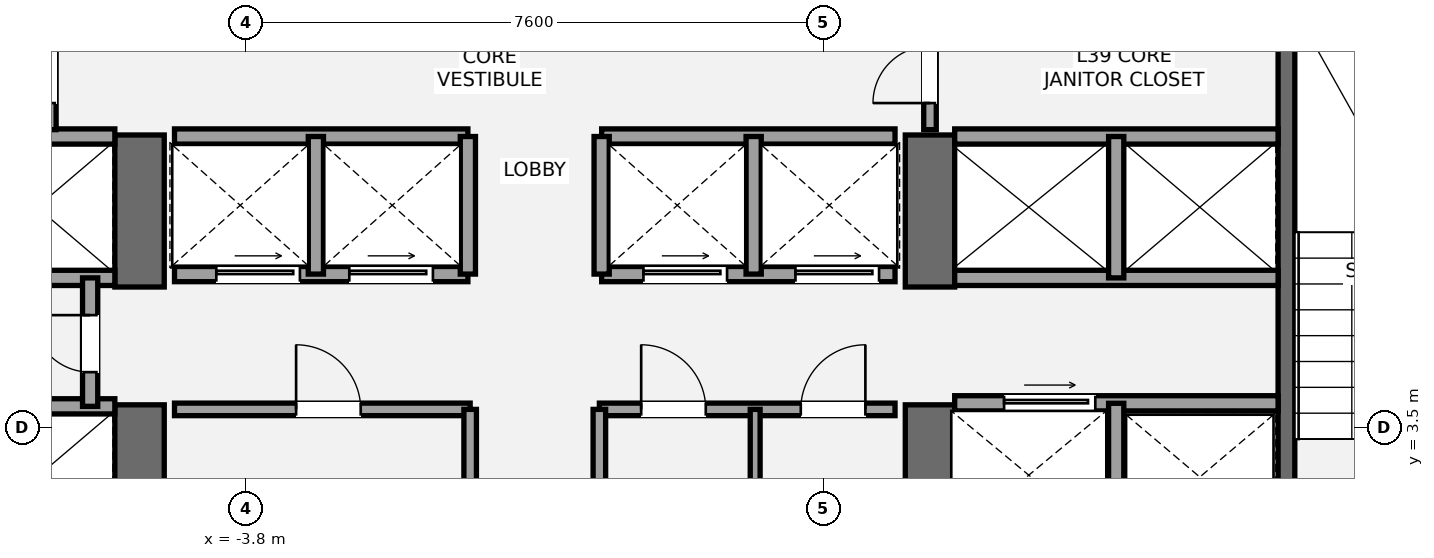
"""IFC4 building model, lengths in metres.
Left out: names, types, materials, properties, quantities, classifications, styles, units other than length and angle.
Written with IfcOpenShell. Run it as: python <this file> out.ifc"""

import sys

from ifc_helpers import new_model, si_unit, direction, frame, frame_2d, origin, place, context, subcontext, project, spatial, rectangle, extrude, element, fill, save


model = new_model("IFC4")
c1 = context("Model", 3, precision=1e-05, world=origin(), true_north=direction((0.0, 1.0)))
c2 = subcontext(c1, "Body", "Model", "MODEL_VIEW")
j1 = project(units=[si_unit("LENGTHUNIT", "METRE"), si_unit("PLANEANGLEUNIT", "RADIAN")], contexts=[c1])
p1 = place(None, origin())
s1 = spatial("IfcSite", under=j1, at=p1, CompositionType="ELEMENT")
p2 = place(p1, origin())
s2 = spatial("IfcBuilding", under=s1, at=p2, CompositionType="ELEMENT")
p3 = place(p2, frame((0.0, 0.0, 147.0)))
s3 = spatial("IfcBuildingStorey", under=s2, at=p3, CompositionType="ELEMENT", Elevation=147.0)
p4 = place(p3, frame((-5.2, 1.2, 0.0), z_axis=(0.0, 0.0, 1.0), x_axis=(0.0, 1.0, 0.0)))
e1 = element("IfcWall", 1, at=p4, inside=s3, PredefinedType="SHEAR", context=c2, shape_type="SweptSolid", body=[
    extrude(rectangle(XDim=2.6, YDim=0.65, at=frame_2d((1.3, 0.0))), origin(), (0.0, 0.0, 1.0), 3.2),
])
p5 = place(p3, frame((-5.2, 5.35, 0.0), z_axis=(0.0, 0.0, 1.0), x_axis=(0.0, 1.0, 0.0)))
e2 = element("IfcWall", 2, at=p5, inside=s3, PredefinedType="SHEAR", context=c2, shape_type="SweptSolid", body=[
    extrude(rectangle(XDim=2.0, YDim=0.65, at=frame_2d((1.0, 0.0))), origin(), (0.0, 0.0, 1.0), 3.2),
])
p6 = place(p3, frame((5.2, 1.2, 0.0), z_axis=(0.0, 0.0, 1.0), x_axis=(0.0, 1.0, 0.0)))
e3 = element("IfcWall", 3, at=p6, inside=s3, PredefinedType="SHEAR", context=c2, shape_type="SweptSolid", body=[
    extrude(rectangle(XDim=2.6, YDim=0.65, at=frame_2d((1.3, 0.0))), origin(), (0.0, 0.0, 1.0), 3.2),
])
p7 = place(p3, frame((5.2, 5.35, 0.0), z_axis=(0.0, 0.0, 1.0), x_axis=(0.0, 1.0, 0.0)))
e4 = element("IfcWall", 4, at=p7, inside=s3, PredefinedType="SHEAR", context=c2, shape_type="SweptSolid", body=[
    extrude(rectangle(XDim=2.0, YDim=0.65, at=frame_2d((1.0, 0.0))), origin(), (0.0, 0.0, 1.0), 3.2),
])
p8 = place(p3, frame((9.89, 1.85, 0.0), z_axis=(0.0, 0.0, 1.0), x_axis=(0.0, 1.0, 0.0)))
e5 = element("IfcWall", 5, at=p8, inside=s3, PredefinedType="SHEAR", context=c2, shape_type="SweptSolid", body=[
    extrude(rectangle(XDim=7.15, YDim=0.22, at=frame_2d((3.575, 0.0))), origin(), (0.0, 0.0, 1.0), 3.2),
])
for number, where, z_axis, x_axis in (
    (6, (-9.78, 3.78, 0.0), (0.0, 0.0, 1.0), (1.0, 0.0, 0.0)),
    (7, (-9.78, 5.47, 0.0), (0.0, 0.0, 1.0), (1.0, 0.0, 0.0)),
    (8, (-9.78, 7.33, 0.0), (0.0, 0.0, 1.0), (1.0, 0.0, 0.0)),
):
    element("IfcWall", number, at=place(p3, frame(where, z_axis=z_axis, x_axis=x_axis)), inside=s3, PredefinedType="SOLIDWALL", context=c2, shape_type="SweptSolid", body=[
        extrude(rectangle(XDim=4.255, YDim=0.2, at=frame_2d((2.127, 0.0))), origin(), (0.0, 0.0, 1.0), 3.02),
    ])
p9 = place(p3, frame((-5.85, 3.78, 0.0), z_axis=(0.0, 0.0, 1.0), x_axis=(0.0, 1.0, 0.0)))
e9 = element("IfcWall", 9, at=p9, inside=s3, PredefinedType="SOLIDWALL", context=c2, shape_type="SweptSolid", body=[
    extrude(rectangle(XDim=1.69, YDim=0.2, at=frame_2d((0.845, 0.0))), origin(), (0.0, 0.0, 1.0), 3.02),
])
p10 = place(p9, frame((0.45, 0.0, 0.0)))
e10 = element("IfcOpeningElement", 10, at=p10, cuts=e9, PredefinedType="OPENING", context=c2, shape_type="SweptSolid", body=[
    extrude(rectangle(XDim=0.75, YDim=2.1, at=frame_2d((0.375, 1.05))), frame((0.0, 0.11, 0.0), z_axis=(0.0, -1.0, 0.0), x_axis=(1.0, 0.0, 0.0)), (0.0, 0.0, 1.0), 0.22),
])
p11 = place(p3, frame((5.525, 3.82, 0.0), z_axis=(0.0, 0.0, 1.0), x_axis=(1.0, 0.0, 0.0)))
e11 = element("IfcWall", 11, at=p11, inside=s3, PredefinedType="SOLIDWALL", context=c2, shape_type="SweptSolid", body=[
    extrude(rectangle(XDim=4.255, YDim=0.2, at=frame_2d((2.127, 0.0))), origin(), (0.0, 0.0, 1.0), 3.02),
])
p12 = place(p11, frame((0.65, 0.0, 0.0)))
e12 = element("IfcOpeningElement", 12, at=p12, cuts=e11, PredefinedType="OPENING", context=c2, shape_type="SweptSolid", body=[
    extrude(rectangle(XDim=1.2, YDim=2.2, at=frame_2d((0.6, 1.1))), frame((0.0, 0.11, 0.0), z_axis=(0.0, -1.0, 0.0), x_axis=(1.0, 0.0, 0.0)), (0.0, 0.0, 1.0), 0.22),
])
p13 = place(p3, frame((7.65, 1.85, 0.0), z_axis=(0.0, 0.0, 1.0), x_axis=(0.0, 1.0, 0.0)))
e13 = element("IfcWall", 13, at=p13, inside=s3, PredefinedType="SOLIDWALL", context=c2, shape_type="SweptSolid", body=[
    extrude(rectangle(XDim=1.97, YDim=0.2, at=frame_2d((0.985, 0.0))), origin(), (0.0, 0.0, 1.0), 3.02),
])
for number, where, z_axis, x_axis in (
    (14, (5.525, 5.47, 0.0), (0.0, 0.0, 1.0), (1.0, 0.0, 0.0)),
    (15, (5.525, 7.33, 0.0), (0.0, 0.0, 1.0), (1.0, 0.0, 0.0)),
):
    element("IfcWall", number, at=place(p3, frame(where, z_axis=z_axis, x_axis=x_axis)), inside=s3, PredefinedType="SOLIDWALL", context=c2, shape_type="SweptSolid", body=[
        extrude(rectangle(XDim=4.255, YDim=0.2, at=frame_2d((2.127, 0.0))), origin(), (0.0, 0.0, 1.0), 3.02),
    ])
p14 = place(p3, frame((7.65, 5.47, 0.0), z_axis=(0.0, 0.0, 1.0), x_axis=(0.0, 1.0, 0.0)))
e16 = element("IfcWall", 16, at=p14, inside=s3, PredefinedType="SOLIDWALL", context=c2, shape_type="SweptSolid", body=[
    extrude(rectangle(XDim=1.86, YDim=0.2, at=frame_2d((0.93, 0.0))), origin(), (0.0, 0.0, 1.0), 3.02),
])
p15 = place(p3, frame((-4.74, 3.74, 0.0), z_axis=(0.0, 0.0, 1.0), x_axis=(1.0, 0.0, 0.0)))
e17 = element("IfcWall", 17, at=p15, inside=s3, PredefinedType="PARTITIONING", context=c2, shape_type="SweptSolid", body=[
    extrude(rectangle(XDim=3.89, YDim=0.165, at=frame_2d((1.945, 0.0))), origin(), (0.0, 0.0, 1.0), 3.02),
])
p16 = place(p15, frame((1.6, 0.0, 0.0)))
e18 = element("IfcOpeningElement", 18, at=p16, cuts=e17, PredefinedType="OPENING", context=c2, shape_type="SweptSolid", body=[
    extrude(rectangle(XDim=0.85, YDim=2.1, at=frame_2d((0.425, 1.05))), frame((0.0, 0.093, 0.0), z_axis=(0.0, -1.0, 0.0), x_axis=(1.0, 0.0, 0.0)), (0.0, 0.0, 1.0), 0.185),
])
p17 = place(p3, frame((-0.85, 1.92, 0.0), z_axis=(0.0, 0.0, 1.0), x_axis=(0.0, 1.0, 0.0)))
e19 = element("IfcWall", 19, at=p17, inside=s3, PredefinedType="PARTITIONING", context=c2, shape_type="SweptSolid", body=[
    extrude(rectangle(XDim=1.82, YDim=0.165, at=frame_2d((0.91, 0.0))), origin(), (0.0, 0.0, 1.0), 3.02),
])
p18 = place(p3, frame((0.85, 3.74, 0.0), z_axis=(0.0, 0.0, 1.0), x_axis=(1.0, 0.0, 0.0)))
e20 = element("IfcWall", 20, at=p18, inside=s3, PredefinedType="PARTITIONING", context=c2, shape_type="SweptSolid", body=[
    extrude(rectangle(XDim=3.89, YDim=0.165, at=frame_2d((1.945, 0.0))), origin(), (0.0, 0.0, 1.0), 3.02),
])
p19 = place(p18, frame((0.55, 0.0, 0.0)))
e21 = element("IfcOpeningElement", 21, at=p19, cuts=e20, PredefinedType="OPENING", context=c2, shape_type="SweptSolid", body=[
    extrude(rectangle(XDim=0.85, YDim=2.1, at=frame_2d((0.425, 1.05))), frame((0.0, 0.093, 0.0), z_axis=(0.0, -1.0, 0.0), x_axis=(1.0, 0.0, 0.0)), (0.0, 0.0, 1.0), 0.185),
])
p20 = place(p18, frame((2.65, 0.0, 0.0)))
e22 = element("IfcOpeningElement", 22, at=p20, cuts=e20, PredefinedType="OPENING", context=c2, shape_type="SweptSolid", body=[
    extrude(rectangle(XDim=0.85, YDim=2.1, at=frame_2d((0.425, 1.05))), frame((0.0, 0.093, 0.0), z_axis=(0.0, -1.0, 0.0), x_axis=(1.0, 0.0, 0.0)), (0.0, 0.0, 1.0), 0.185),
])
p21 = place(p3, frame((0.85, 1.92, 0.0), z_axis=(0.0, 0.0, 1.0), x_axis=(0.0, 1.0, 0.0)))
e23 = element("IfcWall", 23, at=p21, inside=s3, PredefinedType="PARTITIONING", context=c2, shape_type="SweptSolid", body=[
    extrude(rectangle(XDim=1.82, YDim=0.165, at=frame_2d((0.91, 0.0))), origin(), (0.0, 0.0, 1.0), 3.02),
])
p22 = place(p3, frame((2.9, 1.92, 0.0), z_axis=(0.0, 0.0, 1.0), x_axis=(0.0, 1.0, 0.0)))
e24 = element("IfcWall", 24, at=p22, inside=s3, PredefinedType="PARTITIONING", context=c2, shape_type="SweptSolid", body=[
    extrude(rectangle(XDim=1.82, YDim=0.13, at=frame_2d((0.91, 0.0))), origin(), (0.0, 0.0, 1.0), 3.02),
])
p23 = place(p3, frame((-4.74, 5.52, 0.0), z_axis=(0.0, 0.0, 1.0), x_axis=(1.0, 0.0, 0.0)))
e25 = element("IfcWall", 25, at=p23, inside=s3, PredefinedType="SOLIDWALL", context=c2, shape_type="SweptSolid", body=[
    extrude(rectangle(XDim=3.86, YDim=0.2, at=frame_2d((1.93, 0.0))), origin(), (0.0, 0.0, 1.0), 3.02),
])
p24 = place(p23, frame((0.55, 0.0, 0.0)))
e26 = element("IfcOpeningElement", 26, at=p24, cuts=e25, PredefinedType="OPENING", context=c2, shape_type="SweptSolid", body=[
    extrude(rectangle(XDim=1.1, YDim=2.2, at=frame_2d((0.55, 1.1))), frame((0.0, 0.11, 0.0), z_axis=(0.0, -1.0, 0.0), x_axis=(1.0, 0.0, 0.0)), (0.0, 0.0, 1.0), 0.22),
])
p25 = place(p23, frame((2.3, 0.0, 0.0)))
e27 = element("IfcOpeningElement", 27, at=p25, cuts=e25, PredefinedType="OPENING", context=c2, shape_type="SweptSolid", body=[
    extrude(rectangle(XDim=1.1, YDim=2.2, at=frame_2d((0.55, 1.1))), frame((0.0, 0.11, 0.0), z_axis=(0.0, -1.0, 0.0), x_axis=(1.0, 0.0, 0.0)), (0.0, 0.0, 1.0), 0.22),
])
p26 = place(p3, frame((0.88, 5.52, 0.0), z_axis=(0.0, 0.0, 1.0), x_axis=(1.0, 0.0, 0.0)))
e28 = element("IfcWall", 28, at=p26, inside=s3, PredefinedType="SOLIDWALL", context=c2, shape_type="SweptSolid", body=[
    extrude(rectangle(XDim=3.86, YDim=0.2, at=frame_2d((1.93, 0.0))), origin(), (0.0, 0.0, 1.0), 3.02),
])
p27 = place(p26, frame((0.55, 0.0, 0.0)))
e29 = element("IfcOpeningElement", 29, at=p27, cuts=e28, PredefinedType="OPENING", context=c2, shape_type="SweptSolid", body=[
    extrude(rectangle(XDim=1.1, YDim=2.2, at=frame_2d((0.55, 1.1))), frame((0.0, 0.11, 0.0), z_axis=(0.0, -1.0, 0.0), x_axis=(1.0, 0.0, 0.0)), (0.0, 0.0, 1.0), 0.22),
])
p28 = place(p26, frame((2.55, 0.0, 0.0)))
e30 = element("IfcOpeningElement", 30, at=p28, cuts=e28, PredefinedType="OPENING", context=c2, shape_type="SweptSolid", body=[
    extrude(rectangle(XDim=1.1, YDim=2.2, at=frame_2d((0.55, 1.1))), frame((0.0, 0.11, 0.0), z_axis=(0.0, -1.0, 0.0), x_axis=(1.0, 0.0, 0.0)), (0.0, 0.0, 1.0), 0.22),
])
for number, where, z_axis, x_axis in (
    (31, (-4.74, 7.33, 0.0), (0.0, 0.0, 1.0), (1.0, 0.0, 0.0)),
    (32, (0.88, 7.33, 0.0), (0.0, 0.0, 1.0), (1.0, 0.0, 0.0)),
):
    element("IfcWall", number, at=place(p3, frame(where, z_axis=z_axis, x_axis=x_axis)), inside=s3, PredefinedType="SOLIDWALL", context=c2, shape_type="SweptSolid", body=[
        extrude(rectangle(XDim=3.86, YDim=0.2, at=frame_2d((1.93, 0.0))), origin(), (0.0, 0.0, 1.0), 3.02),
    ])
for number, where, z_axis, x_axis in (
    (33, (-2.88, 5.52, 0.0), (0.0, 0.0, 1.0), (0.0, 1.0, 0.0)),
    (34, (2.88, 5.52, 0.0), (0.0, 0.0, 1.0), (0.0, 1.0, 0.0)),
    (35, (-0.88, 5.52, 0.0), (0.0, 0.0, 1.0), (0.0, 1.0, 0.0)),
    (36, (0.88, 5.52, 0.0), (0.0, 0.0, 1.0), (0.0, 1.0, 0.0)),
):
    element("IfcWall", number, at=place(p3, frame(where, z_axis=z_axis, x_axis=x_axis)), inside=s3, PredefinedType="SOLIDWALL", context=c2, shape_type="SweptSolid", body=[
        extrude(rectangle(XDim=1.81, YDim=0.2, at=frame_2d((0.905, 0.0))), origin(), (0.0, 0.0, 1.0), 3.02),
    ])
p29 = place(p3, frame((-6.38, 7.42, 0.0), z_axis=(0.0, 0.0, 1.0), x_axis=(0.0, 1.0, 0.0)))
e37 = element("IfcWall", 37, at=p29, inside=s3, PredefinedType="PARTITIONING", context=c2, shape_type="SweptSolid", body=[
    extrude(rectangle(XDim=1.58, YDim=0.165, at=frame_2d((0.79, 0.0))), origin(), (0.0, 0.0, 1.0), 3.02),
])
p30 = place(p29, frame((0.35, 0.0, 0.0)))
e38 = element("IfcOpeningElement", 38, at=p30, cuts=e37, PredefinedType="OPENING", context=c2, shape_type="SweptSolid", body=[
    extrude(rectangle(XDim=0.75, YDim=2.1, at=frame_2d((0.375, 1.05))), frame((0.0, 0.093, 0.0), z_axis=(0.0, -1.0, 0.0), x_axis=(1.0, 0.0, 0.0)), (0.0, 0.0, 1.0), 0.185),
])
p31 = place(p3, frame((5.2, 7.42, 0.0), z_axis=(0.0, 0.0, 1.0), x_axis=(0.0, 1.0, 0.0)))
e39 = element("IfcWall", 39, at=p31, inside=s3, PredefinedType="PARTITIONING", context=c2, shape_type="SweptSolid", body=[
    extrude(rectangle(XDim=1.58, YDim=0.165, at=frame_2d((0.79, 0.0))), origin(), (0.0, 0.0, 1.0), 3.02),
])
p32 = place(p31, frame((0.35, 0.0, 0.0)))
e40 = element("IfcOpeningElement", 40, at=p32, cuts=e39, PredefinedType="OPENING", context=c2, shape_type="SweptSolid", body=[
    extrude(rectangle(XDim=0.75, YDim=2.1, at=frame_2d((0.375, 1.05))), frame((0.0, 0.093, 0.0), z_axis=(0.0, -1.0, 0.0), x_axis=(1.0, 0.0, 0.0)), (0.0, 0.0, 1.0), 0.185),
])
p33 = place(p10, origin())
e41 = element("IfcDoor", 41, at=p33, inside=s3, OperationType="SINGLE_SWING_RIGHT", PredefinedType="DOOR", context=c2, shape_type="SweptSolid", body=[
    extrude(rectangle(XDim=0.75, YDim=2.1, at=frame_2d((0.375, 1.05))), frame((0.0, 0.025, 0.0), z_axis=(0.0, -1.0, 0.0), x_axis=(1.0, 0.0, 0.0)), (0.0, 0.0, 1.0), 0.05),
])
fill(e10, e41)
p34 = place(p12, origin())
e42 = element("IfcDoor", 42, at=p34, inside=s3, OperationType="SLIDING_TO_RIGHT", PredefinedType="DOOR", context=c2, shape_type="SweptSolid", body=[
    extrude(rectangle(XDim=1.2, YDim=2.2, at=frame_2d((0.6, 1.1))), frame((0.0, 0.025, 0.0), z_axis=(0.0, -1.0, 0.0), x_axis=(1.0, 0.0, 0.0)), (0.0, 0.0, 1.0), 0.05),
])
fill(e12, e42)
p35 = place(p16, origin())
e43 = element("IfcDoor", 43, at=p35, inside=s3, OperationType="SINGLE_SWING_LEFT", PredefinedType="DOOR", context=c2, shape_type="SweptSolid", body=[
    extrude(rectangle(XDim=0.85, YDim=2.1, at=frame_2d((0.425, 1.05))), frame((0.0, 0.025, 0.0), z_axis=(0.0, -1.0, 0.0), x_axis=(1.0, 0.0, 0.0)), (0.0, 0.0, 1.0), 0.05),
])
fill(e18, e43)
p36 = place(p19, origin())
e44 = element("IfcDoor", 44, at=p36, inside=s3, OperationType="SINGLE_SWING_LEFT", PredefinedType="DOOR", context=c2, shape_type="SweptSolid", body=[
    extrude(rectangle(XDim=0.85, YDim=2.1, at=frame_2d((0.425, 1.05))), frame((0.0, 0.025, 0.0), z_axis=(0.0, -1.0, 0.0), x_axis=(1.0, 0.0, 0.0)), (0.0, 0.0, 1.0), 0.05),
])
fill(e21, e44)
p37 = place(p20, origin())
e45 = element("IfcDoor", 45, at=p37, inside=s3, OperationType="SINGLE_SWING_RIGHT", PredefinedType="DOOR", context=c2, shape_type="SweptSolid", body=[
    extrude(rectangle(XDim=0.85, YDim=2.1, at=frame_2d((0.425, 1.05))), frame((0.0, 0.025, 0.0), z_axis=(0.0, -1.0, 0.0), x_axis=(1.0, 0.0, 0.0)), (0.0, 0.0, 1.0), 0.05),
])
fill(e22, e45)
p38 = place(p24, origin())
e46 = element("IfcDoor", 46, at=p38, inside=s3, OperationType="SLIDING_TO_LEFT", PredefinedType="DOOR", context=c2, shape_type="SweptSolid", body=[
    extrude(rectangle(XDim=1.1, YDim=2.2, at=frame_2d((0.55, 1.1))), frame((0.0, 0.025, 0.0), z_axis=(0.0, -1.0, 0.0), x_axis=(1.0, 0.0, 0.0)), (0.0, 0.0, 1.0), 0.05),
])
fill(e26, e46)
p39 = place(p25, origin())
e47 = element("IfcDoor", 47, at=p39, inside=s3, OperationType="SLIDING_TO_LEFT", PredefinedType="DOOR", context=c2, shape_type="SweptSolid", body=[
    extrude(rectangle(XDim=1.1, YDim=2.2, at=frame_2d((0.55, 1.1))), frame((0.0, 0.025, 0.0), z_axis=(0.0, -1.0, 0.0), x_axis=(1.0, 0.0, 0.0)), (0.0, 0.0, 1.0), 0.05),
])
fill(e27, e47)
p40 = place(p27, origin())
e48 = element("IfcDoor", 48, at=p40, inside=s3, OperationType="SLIDING_TO_LEFT", PredefinedType="DOOR", context=c2, shape_type="SweptSolid", body=[
    extrude(rectangle(XDim=1.1, YDim=2.2, at=frame_2d((0.55, 1.1))), frame((0.0, 0.025, 0.0), z_axis=(0.0, -1.0, 0.0), x_axis=(1.0, 0.0, 0.0)), (0.0, 0.0, 1.0), 0.05),
])
fill(e29, e48)
p41 = place(p28, origin())
e49 = element("IfcDoor", 49, at=p41, inside=s3, OperationType="SLIDING_TO_LEFT", PredefinedType="DOOR", context=c2, shape_type="SweptSolid", body=[
    extrude(rectangle(XDim=1.1, YDim=2.2, at=frame_2d((0.55, 1.1))), frame((0.0, 0.025, 0.0), z_axis=(0.0, -1.0, 0.0), x_axis=(1.0, 0.0, 0.0)), (0.0, 0.0, 1.0), 0.05),
])
fill(e30, e49)
p42 = place(p32, origin())
e50 = element("IfcDoor", 50, at=p42, inside=s3, OperationType="SINGLE_SWING_LEFT", PredefinedType="DOOR", context=c2, shape_type="SweptSolid", body=[
    extrude(rectangle(XDim=0.75, YDim=2.1, at=frame_2d((0.375, 1.05))), frame((0.0, 0.025, 0.0), z_axis=(0.0, -1.0, 0.0), x_axis=(1.0, 0.0, 0.0)), (0.0, 0.0, 1.0), 0.05),
])
fill(e40, e50)
save(model, sys.argv[1])
